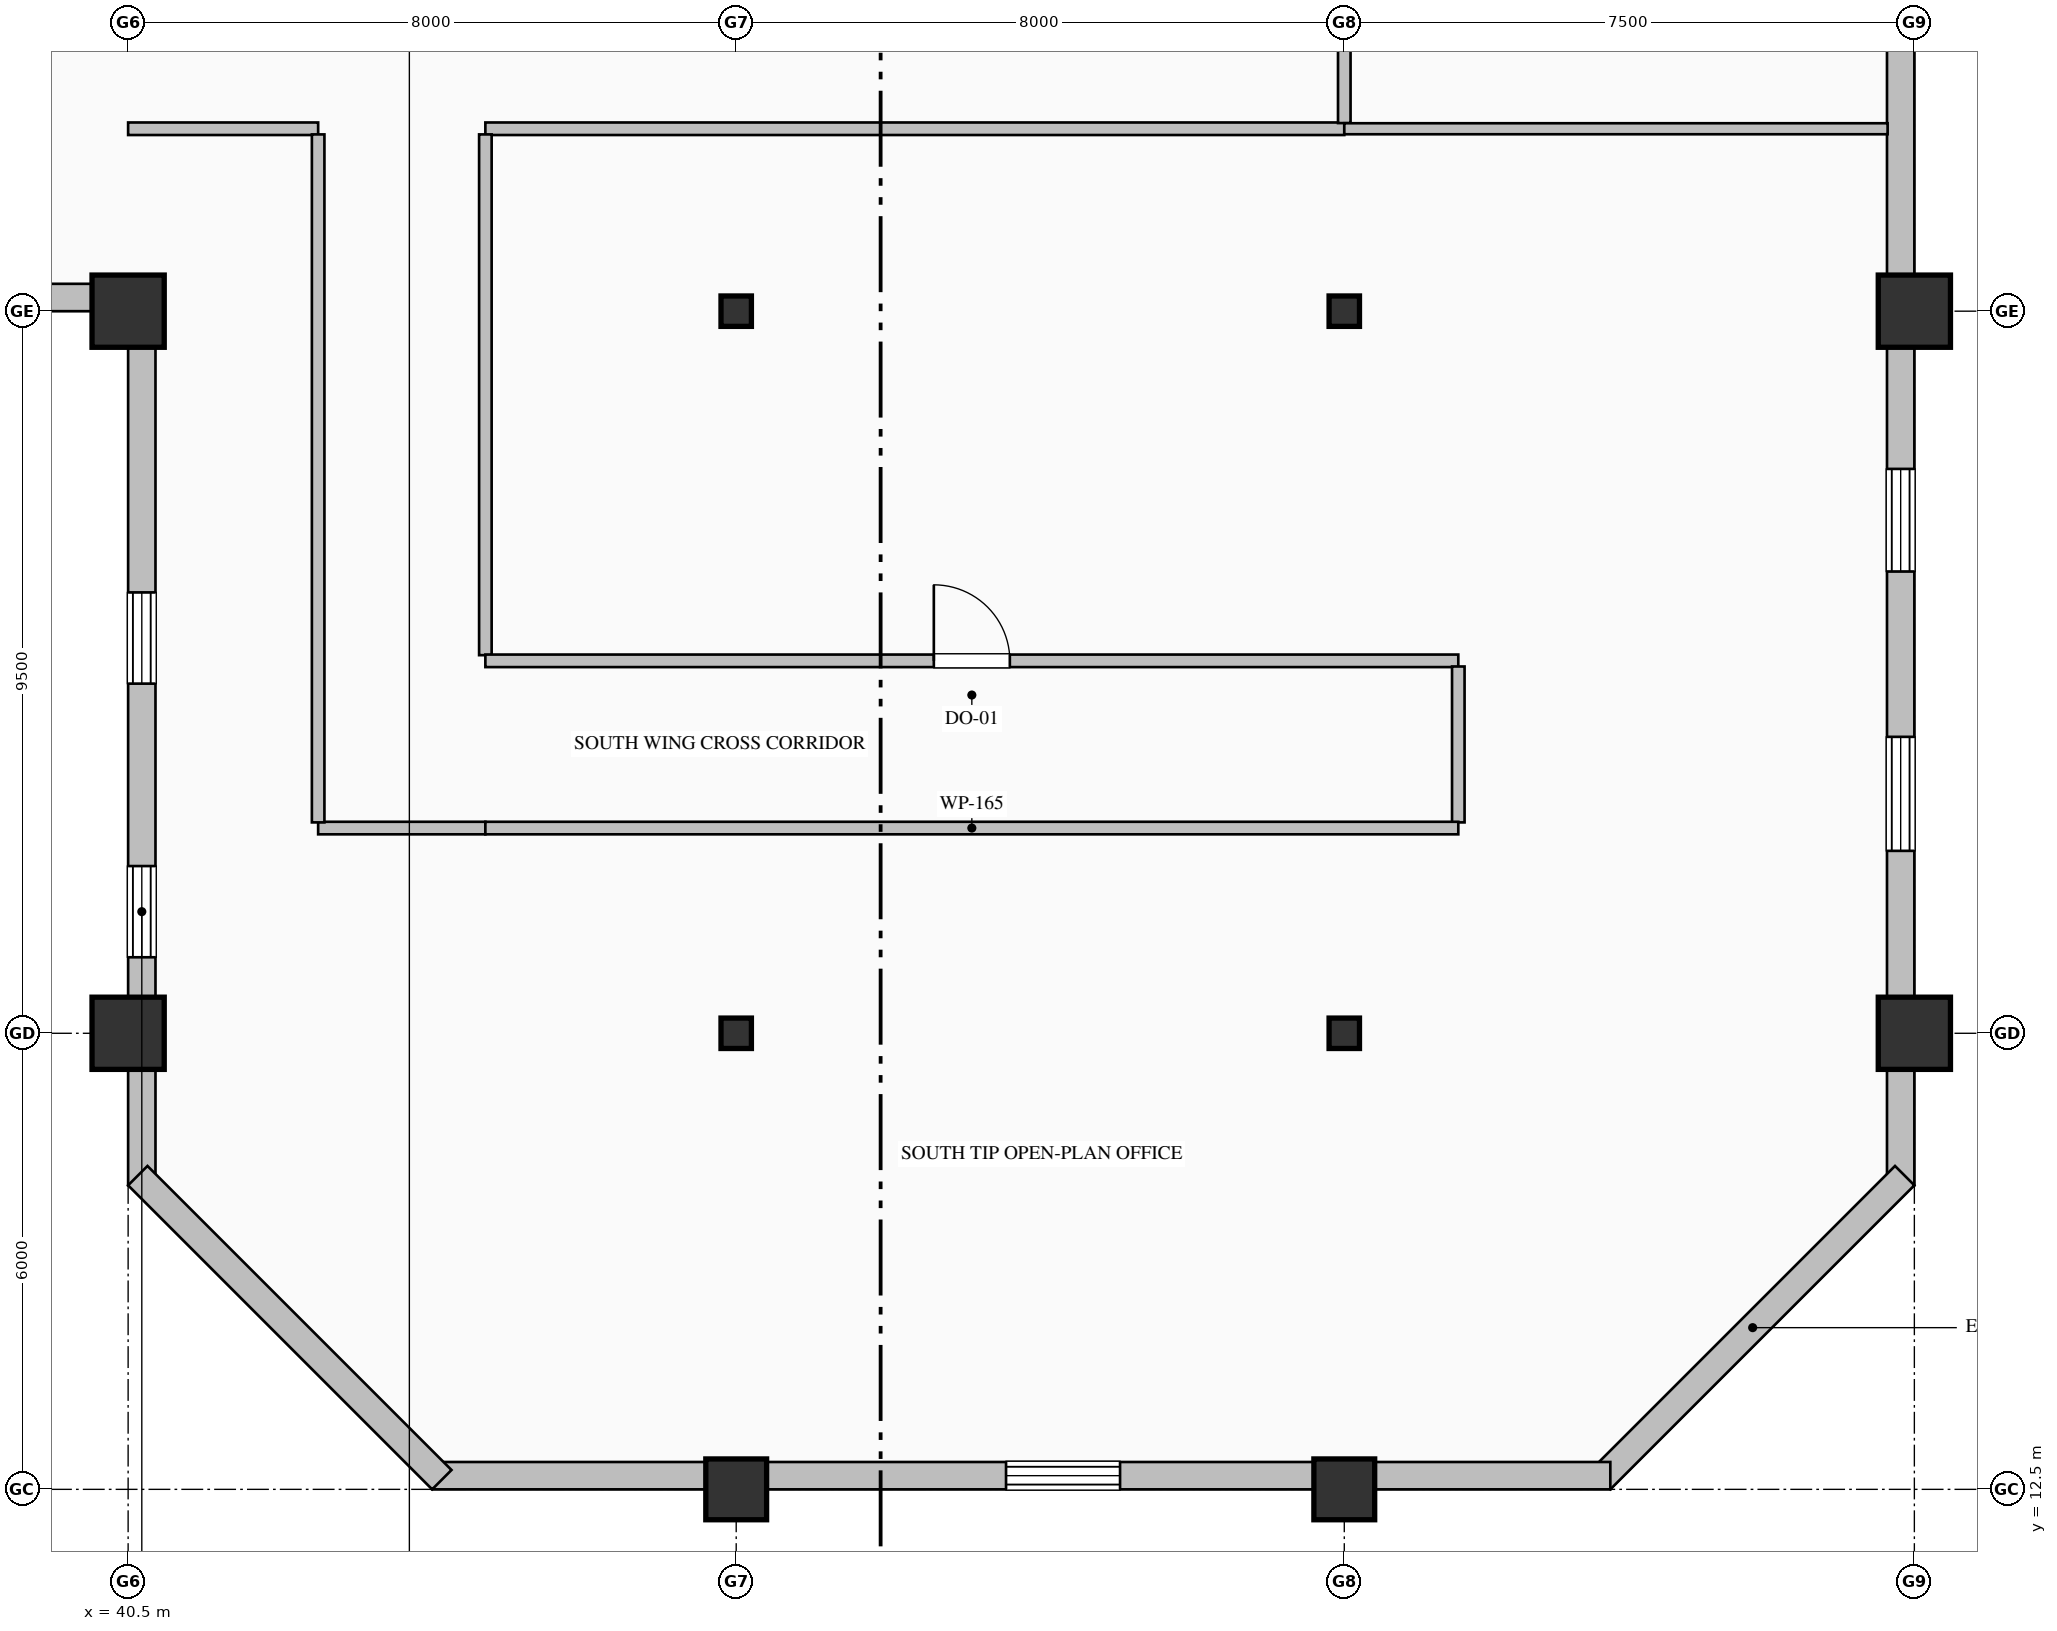
"""IFC4 building model, lengths in metres.
Left out: names, types, materials, properties, quantities, classifications, styles, units other than length and angle.
Written with IfcOpenShell. Run it as: python <this file> out.ifc"""

import sys

from ifc_helpers import new_model, si_unit, direction, frame, frame_2d, origin, origin_2d, place, context, subcontext, project, spatial, rectangle, hollow_rectangle, i_section, extrude, element, fill, save


model = new_model("IFC4")
c1 = context("Model", 3, precision=1e-05, world=origin(), true_north=direction((0.0, 1.0)))
c2 = subcontext(c1, "Body", "Model", "MODEL_VIEW")
j1 = project(units=[si_unit("LENGTHUNIT", "METRE"), si_unit("PLANEANGLEUNIT", "RADIAN")], contexts=[c1])
p1 = place(None, origin())
s1 = spatial("IfcSite", under=j1, at=p1, CompositionType="ELEMENT")
p2 = place(p1, origin())
s2 = spatial("IfcBuilding", under=s1, at=p2, CompositionType="ELEMENT")
p3 = place(p2, frame((0.0, 0.0, 257.8)))
s3 = spatial("IfcBuildingStorey", under=s2, at=p3, CompositionType="ELEMENT", Elevation=257.8)
for number, where, z_axis, x_axis in (
    (1, (40.5, 18.5, 0.0), (0.0, 0.0, 1.0), (1.0, 0.0, 0.0)),
    (2, (40.5, 28.0, 0.0), (0.0, 0.0, 1.0), (1.0, 0.0, 0.0)),
):
    element("IfcColumn", number, at=place(p3, frame(where, z_axis=z_axis, x_axis=x_axis)), inside=s3, PredefinedType="COLUMN", context=c2, shape_type="SweptSolid", body=[
        extrude(hollow_rectangle(XDim=0.95, YDim=0.95, WallThickness=0.036, at=origin_2d()), origin(), (0.0, 0.0, 1.0), 4.0),
    ])
p4 = place(p3, frame((48.5, 12.5, 0.0), z_axis=(0.0, 0.0, 1.0), x_axis=(1.0, 0.0, 0.0)))
e3 = element("IfcColumn", 3, at=p4, inside=s3, PredefinedType="COLUMN", context=c2, shape_type="SweptSolid", body=[
    extrude(hollow_rectangle(XDim=0.8, YDim=0.8, WallThickness=0.032, at=origin_2d()), origin(), (0.0, 0.0, 1.0), 4.0),
])
for number, where, z_axis, x_axis in (
    (4, (48.5, 18.5, 0.0), (0.0, 0.0, 1.0), (1.0, 0.0, 0.0)),
    (5, (48.5, 28.0, 0.0), (0.0, 0.0, 1.0), (1.0, 0.0, 0.0)),
):
    element("IfcColumn", number, at=place(p3, frame(where, z_axis=z_axis, x_axis=x_axis)), inside=s3, PredefinedType="COLUMN", context=c2, shape_type="SweptSolid", body=[
        extrude(i_section(OverallWidth=0.4, OverallDepth=0.4, WebThickness=0.013, FlangeThickness=0.021, FilletRadius=0.022, at=origin_2d()), origin(), (0.0, 0.0, 1.0), 4.0),
    ])
p5 = place(p3, frame((56.5, 12.5, 0.0), z_axis=(0.0, 0.0, 1.0), x_axis=(1.0, 0.0, 0.0)))
e6 = element("IfcColumn", 6, at=p5, inside=s3, PredefinedType="COLUMN", context=c2, shape_type="SweptSolid", body=[
    extrude(hollow_rectangle(XDim=0.8, YDim=0.8, WallThickness=0.032, at=origin_2d()), origin(), (0.0, 0.0, 1.0), 4.0),
])
for number, where, z_axis, x_axis in (
    (7, (56.5, 18.5, 0.0), (0.0, 0.0, 1.0), (1.0, 0.0, 0.0)),
    (8, (56.5, 28.0, 0.0), (0.0, 0.0, 1.0), (1.0, 0.0, 0.0)),
):
    element("IfcColumn", number, at=place(p3, frame(where, z_axis=z_axis, x_axis=x_axis)), inside=s3, PredefinedType="COLUMN", context=c2, shape_type="SweptSolid", body=[
        extrude(i_section(OverallWidth=0.4, OverallDepth=0.4, WebThickness=0.013, FlangeThickness=0.021, FilletRadius=0.022, at=origin_2d()), origin(), (0.0, 0.0, 1.0), 4.0),
    ])
for number, where, z_axis, x_axis in (
    (9, (64.0, 18.5, 0.0), (0.0, 0.0, 1.0), (1.0, 0.0, 0.0)),
    (10, (64.0, 28.0, 0.0), (0.0, 0.0, 1.0), (1.0, 0.0, 0.0)),
):
    element("IfcColumn", number, at=place(p3, frame(where, z_axis=z_axis, x_axis=x_axis)), inside=s3, PredefinedType="COLUMN", context=c2, shape_type="SweptSolid", body=[
        extrude(hollow_rectangle(XDim=0.95, YDim=0.95, WallThickness=0.036, at=origin_2d()), origin(), (0.0, 0.0, 1.0), 4.0),
    ])
p6 = place(p3, frame((40.68, 16.5, 0.0), z_axis=(0.0, 0.0, 1.0), x_axis=(0.0, 1.0, 0.0)))
e11 = element("IfcWall", 11, at=p6, inside=s3, PredefinedType="SOLIDWALL", context=c2, shape_type="SweptSolid", body=[
    extrude(rectangle(XDim=11.86, YDim=0.36, at=frame_2d((5.93, 0.0))), origin(), (0.0, 0.0, 1.0), 3.187),
])
p7 = place(p6, frame((3.0, 0.0, 0.7)))
e12 = element("IfcOpeningElement", 12, at=p7, cuts=e11, PredefinedType="OPENING", context=c2, shape_type="SweptSolid", body=[
    extrude(rectangle(XDim=1.2, YDim=1.85, at=frame_2d((0.6, 0.925))), frame((0.0, 0.19, 0.0), z_axis=(0.0, -1.0, 0.0), x_axis=(1.0, 0.0, 0.0)), (0.0, 0.0, 1.0), 0.38),
])
p8 = place(p6, frame((6.6, 0.0, 0.9)))
e13 = element("IfcOpeningElement", 13, at=p8, cuts=e11, PredefinedType="OPENING", context=c2, shape_type="SweptSolid", body=[
    extrude(rectangle(XDim=1.2, YDim=1.85, at=frame_2d((0.6, 0.925))), frame((0.0, 0.19, 0.0), z_axis=(0.0, -1.0, 0.0), x_axis=(1.0, 0.0, 0.0)), (0.0, 0.0, 1.0), 0.38),
])
p9 = place(p3, frame((40.52, 28.18, 0.0), z_axis=(0.0, 0.0, 1.0), x_axis=(-1.0, 0.0, 0.0)))
e14 = element("IfcWall", 14, at=p9, inside=s3, PredefinedType="SOLIDWALL", context=c2, shape_type="SweptSolid", body=[
    extrude(rectangle(XDim=27.52, YDim=0.36, at=frame_2d((13.76, 0.0))), origin(), (0.0, 0.0, 1.0), 3.187),
])
p10 = place(p9, frame((10.2, 0.0, 0.7)))
e15 = element("IfcOpeningElement", 15, at=p10, cuts=e14, PredefinedType="OPENING", context=c2, shape_type="SweptSolid", body=[
    extrude(rectangle(XDim=1.2, YDim=1.85, at=frame_2d((0.6, 0.925))), frame((0.0, 0.19, 0.0), z_axis=(0.0, -1.0, 0.0), x_axis=(1.0, 0.0, 0.0)), (0.0, 0.0, 1.0), 0.38),
])
p11 = place(p9, frame((13.8, 0.0, 0.9)))
e16 = element("IfcOpeningElement", 16, at=p11, cuts=e14, PredefinedType="OPENING", context=c2, shape_type="SweptSolid", body=[
    extrude(rectangle(XDim=1.2, YDim=1.85, at=frame_2d((0.6, 0.925))), frame((0.0, 0.19, 0.0), z_axis=(0.0, -1.0, 0.0), x_axis=(1.0, 0.0, 0.0)), (0.0, 0.0, 1.0), 0.38),
])
p12 = place(p9, frame((17.325, 0.0, 0.9)))
e17 = element("IfcOpeningElement", 17, at=p12, cuts=e14, PredefinedType="OPENING", context=c2, shape_type="SweptSolid", body=[
    extrude(rectangle(XDim=1.35, YDim=1.85, at=frame_2d((0.675, 0.925))), frame((0.0, 0.19, 0.0), z_axis=(0.0, -1.0, 0.0), x_axis=(1.0, 0.0, 0.0)), (0.0, 0.0, 1.0), 0.38),
])
p13 = place(p9, frame((21.0, 0.0, 0.7)))
e18 = element("IfcOpeningElement", 18, at=p13, cuts=e14, PredefinedType="OPENING", context=c2, shape_type="SweptSolid", body=[
    extrude(rectangle(XDim=1.2, YDim=1.85, at=frame_2d((0.6, 0.925))), frame((0.0, 0.19, 0.0), z_axis=(0.0, -1.0, 0.0), x_axis=(1.0, 0.0, 0.0)), (0.0, 0.0, 1.0), 0.38),
])
p14 = place(p3, frame((63.82, 36.05, 0.0), z_axis=(0.0, 0.0, 1.0), x_axis=(0.0, -1.0, 0.0)))
e19 = element("IfcWall", 19, at=p14, inside=s3, PredefinedType="SOLIDWALL", context=c2, shape_type="SweptSolid", body=[
    extrude(rectangle(XDim=19.55, YDim=0.36, at=frame_2d((9.775, 0.0))), origin(), (0.0, 0.0, 1.0), 3.325),
])
p15 = place(p14, frame((2.85, 0.0, 0.7)))
e20 = element("IfcOpeningElement", 20, at=p15, cuts=e19, PredefinedType="OPENING", context=c2, shape_type="SweptSolid", body=[
    extrude(rectangle(XDim=1.5, YDim=2.4, at=frame_2d((0.75, 1.2))), frame((0.0, 0.19, 0.0), z_axis=(0.0, -1.0, 0.0), x_axis=(1.0, 0.0, 0.0)), (0.0, 0.0, 1.0), 0.38),
])
p16 = place(p14, frame((10.125, 0.0, 0.9)))
e21 = element("IfcOpeningElement", 21, at=p16, cuts=e19, PredefinedType="OPENING", context=c2, shape_type="SweptSolid", body=[
    extrude(rectangle(XDim=1.35, YDim=1.85, at=frame_2d((0.675, 0.925))), frame((0.0, 0.19, 0.0), z_axis=(0.0, -1.0, 0.0), x_axis=(1.0, 0.0, 0.0)), (0.0, 0.0, 1.0), 0.38),
])
p17 = place(p14, frame((13.65, 0.0, 0.7)))
e22 = element("IfcOpeningElement", 22, at=p17, cuts=e19, PredefinedType="OPENING", context=c2, shape_type="SweptSolid", body=[
    extrude(rectangle(XDim=1.5, YDim=2.4, at=frame_2d((0.75, 1.2))), frame((0.0, 0.19, 0.0), z_axis=(0.0, -1.0, 0.0), x_axis=(1.0, 0.0, 0.0)), (0.0, 0.0, 1.0), 0.38),
])
p18 = place(p3, frame((63.873, 16.627, 0.0), z_axis=(0.0, 0.0, 1.0), x_axis=(-0.707106781187, -0.707106781187, 0.0)))
e23 = element("IfcWall", 23, at=p18, inside=s3, PredefinedType="SOLIDWALL", context=c2, shape_type="SweptSolid", body=[
    extrude(rectangle(XDim=5.657, YDim=0.36, at=frame_2d((2.828, 0.0))), origin(), (0.0, 0.0, 1.0), 3.775),
])
p19 = place(p3, frame((60.0, 12.68, 0.0), z_axis=(0.0, 0.0, 1.0), x_axis=(-1.0, 0.0, 0.0)))
e24 = element("IfcWall", 24, at=p19, inside=s3, PredefinedType="SOLIDWALL", context=c2, shape_type="SweptSolid", body=[
    extrude(rectangle(XDim=15.5, YDim=0.36, at=frame_2d((7.75, 0.0))), origin(), (0.0, 0.0, 1.0), 3.325),
])
p20 = place(p19, frame((6.45, 0.0, 0.7)))
e25 = element("IfcOpeningElement", 25, at=p20, cuts=e24, PredefinedType="OPENING", context=c2, shape_type="SweptSolid", body=[
    extrude(rectangle(XDim=1.5, YDim=2.4, at=frame_2d((0.75, 1.2))), frame((0.0, 0.19, 0.0), z_axis=(0.0, -1.0, 0.0), x_axis=(1.0, 0.0, 0.0)), (0.0, 0.0, 1.0), 0.38),
])
p21 = place(p3, frame((44.627, 12.627, 0.0), z_axis=(0.0, 0.0, 1.0), x_axis=(-0.707106781187, 0.707106781187, 0.0)))
e26 = element("IfcWall", 26, at=p21, inside=s3, PredefinedType="SOLIDWALL", context=c2, shape_type="SweptSolid", body=[
    extrude(rectangle(XDim=5.657, YDim=0.36, at=frame_2d((2.828, 0.0))), origin(), (0.0, 0.0, 1.0), 3.775),
])
p22 = place(p3, frame((43.0, 30.4, 0.0), z_axis=(0.0, 0.0, 1.0), x_axis=(-1.0, 0.0, 0.0)))
e27 = element("IfcWall", 27, at=p22, inside=s3, PredefinedType="PARTITIONING", context=c2, shape_type="SweptSolid", body=[
    extrude(rectangle(XDim=2.5, YDim=0.165, at=frame_2d((1.25, 0.0))), origin(), (0.0, 0.0, 1.0), 3.775),
])
p23 = place(p3, frame((56.5, 30.4, 0.0), z_axis=(0.0, 0.0, 1.0), x_axis=(-1.0, 0.0, 0.0)))
e28 = element("IfcWall", 28, at=p23, inside=s3, PredefinedType="PARTITIONING", context=c2, shape_type="SweptSolid", body=[
    extrude(rectangle(XDim=11.3, YDim=0.165, at=frame_2d((5.65, 0.0))), origin(), (0.0, 0.0, 1.0), 3.775),
])
p24 = place(p3, frame((56.5, 36.0, 0.0), z_axis=(0.0, 0.0, 1.0), x_axis=(0.0, -1.0, 0.0)))
e29 = element("IfcWall", 29, at=p24, inside=s3, PredefinedType="PARTITIONING", context=c2, shape_type="SweptSolid", body=[
    extrude(rectangle(XDim=5.525, YDim=0.165, at=frame_2d((2.763, 0.0))), origin(), (0.0, 0.0, 1.0), 3.179),
])
p25 = place(p24, frame((2.263, 0.0, 0.0)))
e30 = element("IfcOpeningElement", 30, at=p25, cuts=e29, PredefinedType="OPENING", context=c2, shape_type="SweptSolid", body=[
    extrude(rectangle(XDim=1.0, YDim=2.15, at=frame_2d((0.5, 1.075))), frame((0.0, 0.093, 0.0), z_axis=(0.0, -1.0, 0.0), x_axis=(1.0, 0.0, 0.0)), (0.0, 0.0, 1.0), 0.185),
])
p26 = place(p3, frame((45.2, 21.2, 0.0), z_axis=(0.0, 0.0, 1.0), x_axis=(-1.0, 0.0, 0.0)))
e31 = element("IfcWall", 31, at=p26, inside=s3, PredefinedType="PARTITIONING", context=c2, shape_type="SweptSolid", body=[
    extrude(rectangle(XDim=2.2, YDim=0.165, at=frame_2d((1.1, 0.0))), origin(), (0.0, 0.0, 1.0), 3.775),
])
p27 = place(p3, frame((43.0, 21.274, 0.0), z_axis=(0.0, 0.0, 1.0), x_axis=(0.0, 1.0, 0.0)))
e32 = element("IfcWall", 32, at=p27, inside=s3, PredefinedType="PARTITIONING", context=c2, shape_type="SweptSolid", body=[
    extrude(rectangle(XDim=9.051, YDim=0.165, at=frame_2d((4.525, 0.0))), origin(), (0.0, 0.0, 1.0), 3.775),
])
p28 = place(p3, frame((45.2, 30.325, 0.0), z_axis=(0.0, 0.0, 1.0), x_axis=(0.0, -1.0, 0.0)))
e33 = element("IfcWall", 33, at=p28, inside=s3, PredefinedType="PARTITIONING", context=c2, shape_type="SweptSolid", body=[
    extrude(rectangle(XDim=6.851, YDim=0.165, at=frame_2d((3.425, 0.0))), origin(), (0.0, 0.0, 1.0), 3.775),
])
p29 = place(p3, frame((45.2, 23.4, 0.0), z_axis=(0.0, 0.0, 1.0), x_axis=(1.0, 0.0, 0.0)))
e34 = element("IfcWall", 34, at=p29, inside=s3, PredefinedType="PARTITIONING", context=c2, shape_type="SweptSolid", body=[
    extrude(rectangle(XDim=12.8, YDim=0.165, at=frame_2d((6.4, 0.0))), origin(), (0.0, 0.0, 1.0), 3.467),
])
p30 = place(p29, frame((5.9, 0.0, 0.0)))
e35 = element("IfcOpeningElement", 35, at=p30, cuts=e34, PredefinedType="OPENING", context=c2, shape_type="SweptSolid", body=[
    extrude(rectangle(XDim=1.0, YDim=2.15, at=frame_2d((0.5, 1.075))), frame((0.0, 0.093, 0.0), z_axis=(0.0, -1.0, 0.0), x_axis=(1.0, 0.0, 0.0)), (0.0, 0.0, 1.0), 0.185),
])
p31 = place(p3, frame((58.0, 23.325, 0.0), z_axis=(0.0, 0.0, 1.0), x_axis=(0.0, -1.0, 0.0)))
e36 = element("IfcWall", 36, at=p31, inside=s3, PredefinedType="PARTITIONING", context=c2, shape_type="SweptSolid", body=[
    extrude(rectangle(XDim=2.051, YDim=0.165, at=frame_2d((1.025, 0.0))), origin(), (0.0, 0.0, 1.0), 3.775),
])
p32 = place(p3, frame((58.0, 21.2, 0.0), z_axis=(0.0, 0.0, 1.0), x_axis=(-1.0, 0.0, 0.0)))
e37 = element("IfcWall", 37, at=p32, inside=s3, PredefinedType="PARTITIONING", context=c2, shape_type="SweptSolid", body=[
    extrude(rectangle(XDim=12.8, YDim=0.165, at=frame_2d((6.4, 0.0))), origin(), (0.0, 0.0, 1.0), 3.775),
])
p33 = place(p3, frame((56.5, 30.4, 0.0), z_axis=(0.0, 0.0, 1.0), x_axis=(1.0, 0.0, 0.0)))
e38 = element("IfcWall", 38, at=p33, inside=s3, PredefinedType="PARTITIONING", context=c2, shape_type="SweptSolid", body=[
    extrude(rectangle(XDim=7.148, YDim=0.145, at=frame_2d((3.574, 0.0))), origin(), (0.0, 0.0, 1.0), 3.775),
])
p34 = place(p7, origin())
e39 = element("IfcWindow", 39, at=p34, inside=s3, PartitioningType="DOUBLE_PANEL_VERTICAL", PredefinedType="WINDOW", context=c2, shape_type="SweptSolid", body=[
    extrude(rectangle(XDim=1.2, YDim=1.85, at=frame_2d((0.6, 0.925))), frame((0.0, 0.15, 0.0), z_axis=(0.0, -1.0, 0.0), x_axis=(1.0, 0.0, 0.0)), (0.0, 0.0, 1.0), 0.06),
])
fill(e12, e39)
p35 = place(p8, origin())
e40 = element("IfcWindow", 40, at=p35, inside=s3, PartitioningType="DOUBLE_PANEL_VERTICAL", PredefinedType="WINDOW", context=c2, shape_type="SweptSolid", body=[
    extrude(rectangle(XDim=1.2, YDim=1.85, at=frame_2d((0.6, 0.925))), frame((0.0, 0.15, 0.0), z_axis=(0.0, -1.0, 0.0), x_axis=(1.0, 0.0, 0.0)), (0.0, 0.0, 1.0), 0.06),
])
fill(e13, e40)
p36 = place(p16, origin())
e41 = element("IfcWindow", 41, at=p36, inside=s3, PartitioningType="DOUBLE_PANEL_VERTICAL", PredefinedType="WINDOW", context=c2, shape_type="SweptSolid", body=[
    extrude(rectangle(XDim=1.35, YDim=1.85, at=frame_2d((0.675, 0.925))), frame((0.0, 0.15, 0.0), z_axis=(0.0, -1.0, 0.0), x_axis=(1.0, 0.0, 0.0)), (0.0, 0.0, 1.0), 0.06),
])
fill(e21, e41)
p37 = place(p17, origin())
e42 = element("IfcWindow", 42, at=p37, inside=s3, PartitioningType="DOUBLE_PANEL_HORIZONTAL", PredefinedType="WINDOW", context=c2, shape_type="SweptSolid", body=[
    extrude(rectangle(XDim=1.5, YDim=2.4, at=frame_2d((0.75, 1.2))), frame((0.0, 0.15, 0.0), z_axis=(0.0, -1.0, 0.0), x_axis=(1.0, 0.0, 0.0)), (0.0, 0.0, 1.0), 0.06),
])
fill(e22, e42)
p38 = place(p20, origin())
e43 = element("IfcWindow", 43, at=p38, inside=s3, PartitioningType="DOUBLE_PANEL_HORIZONTAL", PredefinedType="WINDOW", context=c2, shape_type="SweptSolid", body=[
    extrude(rectangle(XDim=1.5, YDim=2.4, at=frame_2d((0.75, 1.2))), frame((0.0, 0.15, 0.0), z_axis=(0.0, -1.0, 0.0), x_axis=(1.0, 0.0, 0.0)), (0.0, 0.0, 1.0), 0.06),
])
fill(e25, e43)
p39 = place(p30, origin())
e44 = element("IfcDoor", 44, at=p39, inside=s3, OperationType="SINGLE_SWING_LEFT", PredefinedType="DOOR", context=c2, shape_type="SweptSolid", body=[
    extrude(rectangle(XDim=1.0, YDim=2.15, at=frame_2d((0.5, 1.075))), frame((0.0, 0.025, 0.0), z_axis=(0.0, -1.0, 0.0), x_axis=(1.0, 0.0, 0.0)), (0.0, 0.0, 1.0), 0.05),
])
fill(e35, e44)
save(model, sys.argv[1])
